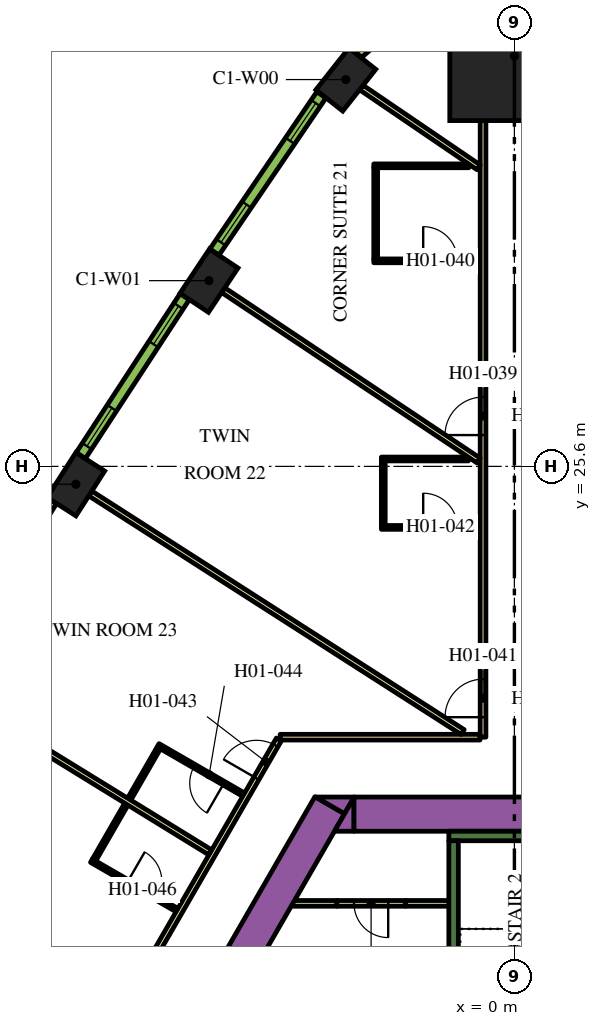
"""IFC4 building model, lengths in metres.
Left out: names, types, materials, properties, quantities, classifications, styles, units other than length and angle.
Written with IfcOpenShell. Run it as: python <this file> out.ifc"""

import sys

from ifc_helpers import new_model, si_unit, direction, frame, frame_2d, origin, origin_2d, place, context, subcontext, project, spatial, polyline, rectangle, outline, extrude, element, fill, save


model = new_model("IFC4")
c1 = context("Model", 3, precision=1e-05, world=origin(), true_north=direction((0.0, 1.0)))
c2 = subcontext(c1, "Body", "Model", "MODEL_VIEW")
j1 = project(units=[si_unit("LENGTHUNIT", "METRE"), si_unit("PLANEANGLEUNIT", "RADIAN")], contexts=[c1])
p1 = place(None, origin())
s1 = spatial("IfcSite", under=j1, at=p1, CompositionType="ELEMENT")
p2 = place(p1, origin())
s2 = spatial("IfcBuilding", under=s1, at=p2, CompositionType="ELEMENT")
p3 = place(p2, frame((0.0, 0.0, 35.4)))
s3 = spatial("IfcBuildingStorey", under=s2, at=p3, CompositionType="ELEMENT", Elevation=35.4)
p4 = place(p3, frame((0.0, 36.399, 0.0), z_axis=(0.0, 0.0, 1.0), x_axis=(0.0, 1.0, 0.0)))
e1 = element("IfcColumn", 1, at=p4, inside=s3, PredefinedType="COLUMN", context=c2, shape_type="SweptSolid", body=[
    extrude(rectangle(XDim=3.4, YDim=3.4, at=origin_2d()), origin(), (0.0, 0.0, 1.0), 3.9),
])
for number, where, z_axis, x_axis in (
    (2, (-4.436, 35.778, 0.0), (0.0, 0.0, 1.0), (-0.62, -0.784, 0.0)),
    (3, (-8.037, 30.487, 0.0), (0.0, 0.0, 1.0), (-0.555, -0.832, 0.0)),
    (4, (-11.539, 25.131, 0.0), (0.0, 0.0, 1.0), (-0.539, -0.842, 0.0)),
):
    element("IfcColumn", number, at=place(p3, frame(where, z_axis=z_axis, x_axis=x_axis)), inside=s3, PredefinedType="COLUMN", context=c2, shape_type="SweptSolid", body=[
        extrude(rectangle(XDim=1.4, YDim=0.9, at=origin_2d()), origin(), (0.0, 0.0, 1.0), 3.9),
    ])
p5 = place(p3, frame((-15.36, -1.503, 0.0), z_axis=(0.0, 0.0, 1.0), x_axis=(0.50000389221, 0.866023156604, 0.0)))
e5 = element("IfcWall", 5, at=p5, inside=s3, PredefinedType="SOLIDWALL", context=c2, shape_type="SweptSolid", body=[
    extrude(rectangle(XDim=21.0, YDim=0.9, at=frame_2d((10.5, 0.0))), origin(), (0.0, 0.0, 1.0), 3.9),
])
p6 = place(p3, origin())
e6 = element("IfcWall", 6, at=p6, inside=s3, PredefinedType="SOLIDWALL", context=c2, shape_type="SweptSolid", body=[
    extrude(outline(polyline([(-4.215, 16.9), (-4.469, 16.46), (-5.231, 16.9), (-4.215, 16.9)])), origin(), (0.0, 0.0, 1.0), 3.9),
])
p7 = place(p3, frame((-4.224, 16.45, 0.0), z_axis=(0.0, 0.0, 1.0), x_axis=(1.0, 0.0, 0.0)))
e7 = element("IfcWall", 7, at=p7, inside=s3, PredefinedType="SOLIDWALL", context=c2, shape_type="SweptSolid", body=[
    extrude(rectangle(XDim=9.488, YDim=0.9, at=frame_2d((4.744, 0.0))), origin(), (0.0, 0.0, 1.0), 3.9),
])
e8 = element("IfcWall", 8, at=p6, inside=s3, PredefinedType="SOLIDWALL", context=c2, shape_type="SweptSolid", body=[
    extrude(outline(polyline([(-4.734, 16.0), (-4.226, 16.88), (-4.226, 16.0), (-4.734, 16.0)])), origin(), (0.0, 0.0, 1.0), 3.9),
])
p8 = place(p3, frame((-1.725, 15.875, 0.0), z_axis=(0.0, 0.0, 1.0), x_axis=(1.0, 0.0, 0.0)))
e9 = element("IfcWall", 9, at=p8, inside=s3, PredefinedType="SOLIDWALL", context=c2, shape_type="SweptSolid", body=[
    extrude(rectangle(XDim=3.45, YDim=0.25, at=frame_2d((1.725, 0.0))), origin(), (0.0, 0.0, 1.0), 3.9),
])
p9 = place(p3, frame((-1.6, 8.7, 0.0), z_axis=(0.0, 0.0, 1.0), x_axis=(0.0, 1.0, 0.0)))
e10 = element("IfcWall", 10, at=p9, inside=s3, PredefinedType="SOLIDWALL", context=c2, shape_type="SweptSolid", body=[
    extrude(rectangle(XDim=7.05, YDim=0.25, at=frame_2d((3.525, 0.0))), origin(), (0.0, 0.0, 1.0), 3.9),
])
p10 = place(p3, frame((-5.851, 14.102, 0.0), z_axis=(0.0, 0.0, 1.0), x_axis=(1.0, 0.0, 0.0)))
e11 = element("IfcWall", 11, at=p10, inside=s3, PredefinedType="PARTITIONING", context=c2, shape_type="SweptSolid", body=[
    extrude(rectangle(XDim=1.18, YDim=0.15, at=frame_2d((0.59, 0.0))), origin(), (0.0, 0.0, 1.0), 2.75),
])
p11 = place(p3, frame((-2.871, 14.102, 0.0), z_axis=(0.0, 0.0, 1.0), x_axis=(1.0, 0.0, 0.0)))
e12 = element("IfcWall", 12, at=p11, inside=s3, PredefinedType="PARTITIONING", context=c2, shape_type="SweptSolid", body=[
    extrude(rectangle(XDim=1.196, YDim=0.15, at=frame_2d((0.598, 0.0))), origin(), (0.0, 0.0, 1.0), 2.75),
])
p12 = place(p3, frame((-2.871, 14.102, 0.0), z_axis=(0.0, 0.0, 1.0), x_axis=(-1.0, 0.0, 0.0)))
e13 = element("IfcWall", 13, at=p12, inside=s3, PredefinedType="PARTITIONING", context=c2, shape_type="SweptSolid", body=[
    extrude(rectangle(XDim=1.8, YDim=0.15, at=frame_2d((0.9, 0.0))), origin(), (0.0, 0.0, 1.0), 2.75),
])
p13 = place(p12, frame((0.45, 0.0, 0.0)))
e14 = element("IfcOpeningElement", 14, at=p13, cuts=e13, PredefinedType="OPENING", context=c2, shape_type="SweptSolid", body=[
    extrude(rectangle(XDim=0.9, YDim=2.1, at=frame_2d((0.45, 1.05))), frame((0.0, 0.085, 0.0), z_axis=(0.0, -1.0, 0.0), x_axis=(1.0, 0.0, 0.0)), (0.0, 0.0, 1.0), 0.17),
])
p14 = place(p3, frame((-0.825, 18.475, 0.0), z_axis=(0.0, 0.0, 1.0), x_axis=(0.0, 1.0, 0.0)))
e15 = element("IfcWall", 15, at=p14, inside=s3, PredefinedType="PARTITIONING", context=c2, shape_type="SweptSolid", body=[
    extrude(rectangle(XDim=16.224, YDim=0.15, at=frame_2d((8.112, 0.0))), origin(), (0.0, 0.0, 1.0), 2.75),
])
p15 = place(p14, frame((7.949, 0.0, 0.0)))
e16 = element("IfcOpeningElement", 16, at=p15, cuts=e15, PredefinedType="OPENING", context=c2, shape_type="SweptSolid", body=[
    extrude(rectangle(XDim=1.0, YDim=2.1, at=frame_2d((0.5, 1.05))), frame((0.0, 0.085, 0.0), z_axis=(0.0, -1.0, 0.0), x_axis=(1.0, 0.0, 0.0)), (0.0, 0.0, 1.0), 0.17),
])
p16 = place(p14, frame((0.526, 0.0, 0.0)))
e17 = element("IfcOpeningElement", 17, at=p16, cuts=e15, PredefinedType="OPENING", context=c2, shape_type="SweptSolid", body=[
    extrude(rectangle(XDim=1.0, YDim=2.1, at=frame_2d((0.5, 1.05))), frame((0.0, 0.085, 0.0), z_axis=(0.0, -1.0, 0.0), x_axis=(1.0, 0.0, 0.0)), (0.0, 0.0, 1.0), 0.17),
])
p17 = place(p3, frame((-6.163, 18.475, 0.0), z_axis=(0.0, 0.0, 1.0), x_axis=(1.0, 0.0, 0.0)))
e18 = element("IfcWall", 18, at=p17, inside=s3, PredefinedType="PARTITIONING", context=c2, shape_type="SweptSolid", body=[
    extrude(rectangle(XDim=5.258, YDim=0.15, at=frame_2d((2.629, 0.0))), origin(), (0.0, 0.0, 1.0), 2.75),
])
p18 = place(p3, frame((-19.081, -3.9, 0.0), z_axis=(0.0, 0.0, 1.0), x_axis=(0.499998313975, 0.866026377209, 0.0)))
e19 = element("IfcWall", 19, at=p18, inside=s3, PredefinedType="PARTITIONING", context=c2, shape_type="SweptSolid", body=[
    extrude(rectangle(XDim=25.766, YDim=0.15, at=frame_2d((12.883, 0.0))), origin(), (0.0, 0.0, 1.0), 2.75),
])
p19 = place(p18, frame((24.586, 0.0, 0.0)))
e20 = element("IfcOpeningElement", 20, at=p19, cuts=e19, PredefinedType="OPENING", context=c2, shape_type="SweptSolid", body=[
    extrude(rectangle(XDim=1.0, YDim=2.1, at=frame_2d((0.5, 1.05))), frame((0.0, 0.085, 0.0), z_axis=(0.0, -1.0, 0.0), x_axis=(1.0, 0.0, 0.0)), (0.0, 0.0, 1.0), 0.17),
])
p20 = place(p18, frame((16.196, 0.0, 0.0)))
e21 = element("IfcOpeningElement", 21, at=p20, cuts=e19, PredefinedType="OPENING", context=c2, shape_type="SweptSolid", body=[
    extrude(rectangle(XDim=1.0, YDim=2.1, at=frame_2d((0.5, 1.05))), frame((0.0, 0.085, 0.0), z_axis=(0.0, -1.0, 0.0), x_axis=(1.0, 0.0, 0.0)), (0.0, 0.0, 1.0), 0.17),
])
p21 = place(p18, frame((14.789, 0.0, 0.0)))
e22 = element("IfcOpeningElement", 22, at=p21, cuts=e19, PredefinedType="OPENING", context=c2, shape_type="SweptSolid", body=[
    extrude(rectangle(XDim=1.1, YDim=2.1, at=frame_2d((0.55, 1.05))), frame((0.0, 0.085, 0.0), z_axis=(0.0, -1.0, 0.0), x_axis=(1.0, 0.0, 0.0)), (0.0, 0.0, 1.0), 0.17),
])
p22 = place(p18, frame((3.698, 0.0, 0.0)))
e23 = element("IfcOpeningElement", 23, at=p22, cuts=e19, PredefinedType="OPENING", context=c2, shape_type="SweptSolid", body=[
    extrude(rectangle(XDim=1.0, YDim=2.1, at=frame_2d((0.5, 1.05))), frame((0.0, 0.085, 0.0), z_axis=(0.0, -1.0, 0.0), x_axis=(1.0, 0.0, 0.0)), (0.0, 0.0, 1.0), 0.17),
])
p23 = place(p18, frame((1.531, 0.0, 0.0)))
e24 = element("IfcOpeningElement", 24, at=p23, cuts=e19, PredefinedType="OPENING", context=c2, shape_type="SweptSolid", body=[
    extrude(rectangle(XDim=0.9, YDim=2.1, at=frame_2d((0.45, 1.05))), frame((0.0, 0.085, 0.0), z_axis=(0.0, -1.0, 0.0), x_axis=(1.0, 0.0, 0.0)), (0.0, 0.0, 1.0), 0.17),
])
p24 = place(p3, frame((-17.856, 13.999, 0.0), z_axis=(0.0, 0.0, 1.0), x_axis=(0.861371519381, -0.507975497047, 0.0)))
e25 = element("IfcWall", 25, at=p24, inside=s3, PredefinedType="PARTITIONING", context=c2, shape_type="SweptSolid", body=[
    extrude(rectangle(XDim=7.804, YDim=0.15, at=frame_2d((3.902, 0.0))), origin(), (0.0, 0.0, 1.0), 2.75),
])
p25 = place(p3, frame((-14.558, 19.475, 0.0), z_axis=(0.0, 0.0, 1.0), x_axis=(0.851829455142, -0.523819223925, 0.0)))
e26 = element("IfcWall", 26, at=p25, inside=s3, PredefinedType="PARTITIONING", context=c2, shape_type="SweptSolid", body=[
    extrude(rectangle(XDim=7.688, YDim=0.15, at=frame_2d((3.844, 0.0))), origin(), (0.0, 0.0, 1.0), 2.75),
])
p26 = place(p3, frame((-11.16, 24.888, 0.0), z_axis=(0.0, 0.0, 1.0), x_axis=(0.84199813156, -0.539480441211, 0.0)))
e27 = element("IfcWall", 27, at=p26, inside=s3, PredefinedType="PARTITIONING", context=c2, shape_type="SweptSolid", body=[
    extrude(rectangle(XDim=11.638, YDim=0.15, at=frame_2d((5.819, 0.0))), origin(), (0.0, 0.0, 1.0), 2.75),
])
p27 = place(p3, frame((-7.662, 30.238, 0.0), z_axis=(0.0, 0.0, 1.0), x_axis=(0.831882886825, -0.554951225431, 0.0)))
e28 = element("IfcWall", 28, at=p27, inside=s3, PredefinedType="PARTITIONING", context=c2, shape_type="SweptSolid", body=[
    extrude(rectangle(XDim=8.079, YDim=0.15, at=frame_2d((4.04, 0.0))), origin(), (0.0, 0.0, 1.0), 2.75),
])
p28 = place(p3, frame((-4.028, 35.569, 0.0), z_axis=(0.0, 0.0, 1.0), x_axis=(0.826730622998, -0.562597971021, 0.0)))
e29 = element("IfcWall", 29, at=p28, inside=s3, PredefinedType="PARTITIONING", context=c2, shape_type="SweptSolid", body=[
    extrude(rectangle(XDim=3.733, YDim=0.15, at=frame_2d((1.867, 0.0))), origin(), (0.0, 0.0, 1.0), 2.75),
])
p29 = place(p3, frame((-3.7, 31.009, 0.0), z_axis=(0.0, 0.0, 1.0), x_axis=(1.0, 0.0, 0.0)))
e30 = element("IfcWall", 30, at=p29, inside=s3, PredefinedType="PARTITIONING", context=c2, shape_type="SweptSolid", body=[
    extrude(rectangle(XDim=2.8, YDim=0.1, at=frame_2d((1.4, 0.0))), origin(), (0.0, 0.0, 1.0), 2.75),
])
p30 = place(p29, frame((1.3, 0.0, 0.0)))
e31 = element("IfcOpeningElement", 31, at=p30, cuts=e30, PredefinedType="OPENING", context=c2, shape_type="SweptSolid", body=[
    extrude(rectangle(XDim=0.9, YDim=2.1, at=frame_2d((0.45, 1.05))), frame((0.0, 0.06, 0.0), z_axis=(0.0, -1.0, 0.0), x_axis=(1.0, 0.0, 0.0)), (0.0, 0.0, 1.0), 0.12),
])
p31 = place(p3, frame((-3.65, 31.059, 0.0), z_axis=(0.0, 0.0, 1.0), x_axis=(0.0, 1.0, 0.0)))
e32 = element("IfcWall", 32, at=p31, inside=s3, PredefinedType="PARTITIONING", context=c2, shape_type="SweptSolid", body=[
    extrude(rectangle(XDim=2.4, YDim=0.1, at=frame_2d((1.2, 0.0))), origin(), (0.0, 0.0, 1.0), 2.75),
])
p32 = place(p3, frame((-1.2, 33.509, 0.0), z_axis=(0.0, 0.0, 1.0), x_axis=(-1.0, 0.0, 0.0)))
e33 = element("IfcWall", 33, at=p32, inside=s3, PredefinedType="PARTITIONING", context=c2, shape_type="SweptSolid", body=[
    extrude(rectangle(XDim=2.5, YDim=0.1, at=frame_2d((1.25, 0.0))), origin(), (0.0, 0.0, 1.0), 2.75),
])
p33 = place(p3, frame((-3.5, 23.995, 0.0), z_axis=(0.0, 0.0, 1.0), x_axis=(1.0, 0.0, 0.0)))
e34 = element("IfcWall", 34, at=p33, inside=s3, PredefinedType="PARTITIONING", context=c2, shape_type="SweptSolid", body=[
    extrude(rectangle(XDim=2.6, YDim=0.1, at=frame_2d((1.3, 0.0))), origin(), (0.0, 0.0, 1.0), 2.75),
])
p34 = place(p33, frame((1.1, 0.0, 0.0)))
e35 = element("IfcOpeningElement", 35, at=p34, cuts=e34, PredefinedType="OPENING", context=c2, shape_type="SweptSolid", body=[
    extrude(rectangle(XDim=0.9, YDim=2.1, at=frame_2d((0.45, 1.05))), frame((0.0, 0.06, 0.0), z_axis=(0.0, -1.0, 0.0), x_axis=(1.0, 0.0, 0.0)), (0.0, 0.0, 1.0), 0.12),
])
p35 = place(p3, frame((-3.45, 24.045, 0.0), z_axis=(0.0, 0.0, 1.0), x_axis=(0.0, 1.0, 0.0)))
e36 = element("IfcWall", 36, at=p35, inside=s3, PredefinedType="PARTITIONING", context=c2, shape_type="SweptSolid", body=[
    extrude(rectangle(XDim=1.7, YDim=0.1, at=frame_2d((0.85, 0.0))), origin(), (0.0, 0.0, 1.0), 2.75),
])
p36 = place(p3, frame((-1.21, 25.795, 0.0), z_axis=(0.0, 0.0, 1.0), x_axis=(-1.0, 0.0, 0.0)))
e37 = element("IfcWall", 37, at=p36, inside=s3, PredefinedType="PARTITIONING", context=c2, shape_type="SweptSolid", body=[
    extrude(rectangle(XDim=2.29, YDim=0.1, at=frame_2d((1.145, 0.0))), origin(), (0.0, 0.0, 1.0), 2.75),
])
p37 = place(p3, frame((-7.124, 16.961, 0.0), z_axis=(0.0, 0.0, 1.0), x_axis=(-0.866021400173, 0.500006934395, 0.0)))
e38 = element("IfcWall", 38, at=p37, inside=s3, PredefinedType="PARTITIONING", context=c2, shape_type="SweptSolid", body=[
    extrude(rectangle(XDim=2.6, YDim=0.1, at=frame_2d((1.3, 0.0))), origin(), (0.0, 0.0, 1.0), 2.75),
])
p38 = place(p37, frame((0.6, 0.0, 0.0)))
e39 = element("IfcOpeningElement", 39, at=p38, cuts=e38, PredefinedType="OPENING", context=c2, shape_type="SweptSolid", body=[
    extrude(rectangle(XDim=0.9, YDim=2.1, at=frame_2d((0.45, 1.05))), frame((0.0, 0.06, 0.0), z_axis=(0.0, -1.0, 0.0), x_axis=(1.0, 0.0, 0.0)), (0.0, 0.0, 1.0), 0.12),
])
p39 = place(p3, frame((-9.362, 18.184, 0.0), z_axis=(0.0, 0.0, 1.0), x_axis=(-0.499992328818, -0.866029832698, 0.0)))
e40 = element("IfcWall", 40, at=p39, inside=s3, PredefinedType="PARTITIONING", context=c2, shape_type="SweptSolid", body=[
    extrude(rectangle(XDim=1.54, YDim=0.1, at=frame_2d((0.77, 0.0))), origin(), (0.0, 0.0, 1.0), 2.75),
])
p40 = place(p3, frame((-11.129, 15.224, 0.0), z_axis=(0.0, 0.0, 1.0), x_axis=(0.866021400173, -0.500006934395, 0.0)))
e41 = element("IfcWall", 41, at=p40, inside=s3, PredefinedType="PARTITIONING", context=c2, shape_type="SweptSolid", body=[
    extrude(rectangle(XDim=2.6, YDim=0.1, at=frame_2d((1.3, 0.0))), origin(), (0.0, 0.0, 1.0), 2.75),
])
p41 = place(p40, frame((1.1, 0.0, 0.0)))
e42 = element("IfcOpeningElement", 42, at=p41, cuts=e41, PredefinedType="OPENING", context=c2, shape_type="SweptSolid", body=[
    extrude(rectangle(XDim=0.9, YDim=2.1, at=frame_2d((0.45, 1.05))), frame((0.0, 0.06, 0.0), z_axis=(0.0, -1.0, 0.0), x_axis=(1.0, 0.0, 0.0)), (0.0, 0.0, 1.0), 0.12),
])
p42 = place(p3, frame((-11.061, 15.242, 0.0), z_axis=(0.0, 0.0, 1.0), x_axis=(0.499976720371, 0.866038843867, 0.0)))
e43 = element("IfcWall", 43, at=p42, inside=s3, PredefinedType="PARTITIONING", context=c2, shape_type="SweptSolid", body=[
    extrude(rectangle(XDim=1.69, YDim=0.1, at=frame_2d((0.845, 0.0))), origin(), (0.0, 0.0, 1.0), 2.75),
])
p43 = place(p3, frame((-3.064, 37.395, 0.0), z_axis=(0.0, 0.0, 1.0), x_axis=(-0.749812680302, -0.661650167731, 0.0)))
e44 = element("IfcWall", 44, at=p43, inside=s3, PredefinedType="SOLIDWALL", context=c2, shape_type="SweptSolid", body=[
    extrude(rectangle(XDim=1.415, YDim=0.29, at=frame_2d((0.708, 0.0))), origin(), (0.0, 0.0, 1.0), 3.65),
])
p44 = place(p43, frame((0.258, 0.0, 0.9)))
e45 = element("IfcOpeningElement", 45, at=p44, cuts=e44, PredefinedType="OPENING", context=c2, shape_type="SweptSolid", body=[
    extrude(rectangle(XDim=0.9, YDim=2.15, at=frame_2d((0.45, 1.075))), frame((0.0, 0.155, 0.0), z_axis=(0.0, -1.0, 0.0), x_axis=(1.0, 0.0, 0.0)), (0.0, 0.0, 1.0), 0.31),
])
p45 = place(p3, frame((-5.078, 35.376, 0.0), z_axis=(0.0, 0.0, 1.0), x_axis=(-0.562610153679, -0.826722332454, 0.0)))
e46 = element("IfcWall", 46, at=p45, inside=s3, PredefinedType="SOLIDWALL", context=c2, shape_type="SweptSolid", body=[
    extrude(rectangle(XDim=5.006, YDim=0.29, at=frame_2d((2.503, 0.0))), origin(), (0.0, 0.0, 1.0), 3.65),
])
p46 = place(p45, frame((0.265, 0.0, 0.9)))
e47 = element("IfcOpeningElement", 47, at=p46, cuts=e46, PredefinedType="OPENING", context=c2, shape_type="SweptSolid", body=[
    extrude(rectangle(XDim=1.2, YDim=2.15, at=frame_2d((0.6, 1.075))), frame((0.0, 0.155, 0.0), z_axis=(0.0, -1.0, 0.0), x_axis=(1.0, 0.0, 0.0)), (0.0, 0.0, 1.0), 0.31),
])
p47 = place(p45, frame((3.495, 0.0, 0.9)))
e48 = element("IfcOpeningElement", 48, at=p47, cuts=e46, PredefinedType="OPENING", context=c2, shape_type="SweptSolid", body=[
    extrude(rectangle(XDim=1.2, YDim=2.15, at=frame_2d((0.6, 1.075))), frame((0.0, 0.155, 0.0), z_axis=(0.0, -1.0, 0.0), x_axis=(1.0, 0.0, 0.0)), (0.0, 0.0, 1.0), 0.31),
])
p48 = place(p3, frame((-8.676, 30.068, 0.0), z_axis=(0.0, 0.0, 1.0), x_axis=(-0.547204617628, -0.836998868845, 0.0)))
e49 = element("IfcWall", 49, at=p48, inside=s3, PredefinedType="SOLIDWALL", context=c2, shape_type="SweptSolid", body=[
    extrude(rectangle(XDim=4.998, YDim=0.29, at=frame_2d((2.499, 0.0))), origin(), (0.0, 0.0, 1.0), 3.65),
])
p49 = place(p48, frame((0.297, 0.0, 0.9)))
e50 = element("IfcOpeningElement", 50, at=p49, cuts=e49, PredefinedType="OPENING", context=c2, shape_type="SweptSolid", body=[
    extrude(rectangle(XDim=1.2, YDim=2.15, at=frame_2d((0.6, 1.075))), frame((0.0, 0.155, 0.0), z_axis=(0.0, -1.0, 0.0), x_axis=(1.0, 0.0, 0.0)), (0.0, 0.0, 1.0), 0.31),
])
p50 = place(p48, frame((3.501, 0.0, 0.9)))
e51 = element("IfcOpeningElement", 51, at=p50, cuts=e49, PredefinedType="OPENING", context=c2, shape_type="SweptSolid", body=[
    extrude(rectangle(XDim=1.2, YDim=2.15, at=frame_2d((0.6, 1.075))), frame((0.0, 0.155, 0.0), z_axis=(0.0, -1.0, 0.0), x_axis=(1.0, 0.0, 0.0)), (0.0, 0.0, 1.0), 0.31),
])
p51 = place(p3, frame((-12.17, 24.699, 0.0), z_axis=(0.0, 0.0, 1.0), x_axis=(-0.531688286542, -0.846940119462, 0.0)))
e52 = element("IfcWall", 52, at=p51, inside=s3, PredefinedType="SOLIDWALL", context=c2, shape_type="SweptSolid", body=[
    extrude(rectangle(XDim=4.998, YDim=0.29, at=frame_2d((2.499, 0.0))), origin(), (0.0, 0.0, 1.0), 3.65),
])
p52 = place(p51, frame((0.297, 0.0, 0.9)))
e53 = element("IfcOpeningElement", 53, at=p52, cuts=e52, PredefinedType="OPENING", context=c2, shape_type="SweptSolid", body=[
    extrude(rectangle(XDim=1.2, YDim=2.15, at=frame_2d((0.6, 1.075))), frame((0.0, 0.155, 0.0), z_axis=(0.0, -1.0, 0.0), x_axis=(1.0, 0.0, 0.0)), (0.0, 0.0, 1.0), 0.31),
])
p53 = place(p51, frame((3.501, 0.0, 0.9)))
e54 = element("IfcOpeningElement", 54, at=p53, cuts=e52, PredefinedType="OPENING", context=c2, shape_type="SweptSolid", body=[
    extrude(rectangle(XDim=1.2, YDim=2.15, at=frame_2d((0.6, 1.075))), frame((0.0, 0.155, 0.0), z_axis=(0.0, -1.0, 0.0), x_axis=(1.0, 0.0, 0.0)), (0.0, 0.0, 1.0), 0.31),
])
p54 = place(p13, origin())
e55 = element("IfcDoor", 55, at=p54, inside=s3, OperationType="SINGLE_SWING_LEFT", PredefinedType="DOOR", context=c2, shape_type="SweptSolid", body=[
    extrude(rectangle(XDim=0.9, YDim=2.1, at=frame_2d((0.45, 1.05))), frame((0.0, 0.025, 0.0), z_axis=(0.0, -1.0, 0.0), x_axis=(1.0, 0.0, 0.0)), (0.0, 0.0, 1.0), 0.05),
])
fill(e14, e55)
p55 = place(p15, origin())
e56 = element("IfcDoor", 56, at=p55, inside=s3, OperationType="SINGLE_SWING_LEFT", PredefinedType="DOOR", context=c2, shape_type="SweptSolid", body=[
    extrude(rectangle(XDim=1.0, YDim=2.1, at=frame_2d((0.5, 1.05))), frame((0.0, 0.025, 0.0), z_axis=(0.0, -1.0, 0.0), x_axis=(1.0, 0.0, 0.0)), (0.0, 0.0, 1.0), 0.05),
])
fill(e16, e56)
p56 = place(p30, origin())
e57 = element("IfcDoor", 57, at=p56, inside=s3, OperationType="SINGLE_SWING_RIGHT", PredefinedType="DOOR", context=c2, shape_type="SweptSolid", body=[
    extrude(rectangle(XDim=0.9, YDim=2.1, at=frame_2d((0.45, 1.05))), frame((0.0, 0.025, 0.0), z_axis=(0.0, -1.0, 0.0), x_axis=(1.0, 0.0, 0.0)), (0.0, 0.0, 1.0), 0.05),
])
fill(e31, e57)
p57 = place(p16, origin())
e58 = element("IfcDoor", 58, at=p57, inside=s3, OperationType="SINGLE_SWING_LEFT", PredefinedType="DOOR", context=c2, shape_type="SweptSolid", body=[
    extrude(rectangle(XDim=1.0, YDim=2.1, at=frame_2d((0.5, 1.05))), frame((0.0, 0.025, 0.0), z_axis=(0.0, -1.0, 0.0), x_axis=(1.0, 0.0, 0.0)), (0.0, 0.0, 1.0), 0.05),
])
fill(e17, e58)
p58 = place(p34, origin())
e59 = element("IfcDoor", 59, at=p58, inside=s3, OperationType="SINGLE_SWING_LEFT", PredefinedType="DOOR", context=c2, shape_type="SweptSolid", body=[
    extrude(rectangle(XDim=0.9, YDim=2.1, at=frame_2d((0.45, 1.05))), frame((0.0, 0.025, 0.0), z_axis=(0.0, -1.0, 0.0), x_axis=(1.0, 0.0, 0.0)), (0.0, 0.0, 1.0), 0.05),
])
fill(e35, e59)
p59 = place(p19, origin())
e60 = element("IfcDoor", 60, at=p59, inside=s3, OperationType="SINGLE_SWING_RIGHT", PredefinedType="DOOR", context=c2, shape_type="SweptSolid", body=[
    extrude(rectangle(XDim=1.0, YDim=2.1, at=frame_2d((0.5, 1.05))), frame((0.0, 0.025, 0.0), z_axis=(0.0, -1.0, 0.0), x_axis=(1.0, 0.0, 0.0)), (0.0, 0.0, 1.0), 0.05),
])
fill(e20, e60)
p60 = place(p38, origin())
e61 = element("IfcDoor", 61, at=p60, inside=s3, OperationType="SINGLE_SWING_LEFT", PredefinedType="DOOR", context=c2, shape_type="SweptSolid", body=[
    extrude(rectangle(XDim=0.9, YDim=2.1, at=frame_2d((0.45, 1.05))), frame((0.0, 0.025, 0.0), z_axis=(0.0, -1.0, 0.0), x_axis=(1.0, 0.0, 0.0)), (0.0, 0.0, 1.0), 0.05),
])
fill(e39, e61)
p61 = place(p41, origin())
e62 = element("IfcDoor", 62, at=p61, inside=s3, OperationType="SINGLE_SWING_RIGHT", PredefinedType="DOOR", context=c2, shape_type="SweptSolid", body=[
    extrude(rectangle(XDim=0.9, YDim=2.1, at=frame_2d((0.45, 1.05))), frame((0.0, 0.025, 0.0), z_axis=(0.0, -1.0, 0.0), x_axis=(1.0, 0.0, 0.0)), (0.0, 0.0, 1.0), 0.05),
])
fill(e42, e62)
p62 = place(p46, origin())
e63 = element("IfcWindow", 63, at=p62, inside=s3, PartitioningType="DOUBLE_PANEL_VERTICAL", PredefinedType="WINDOW", context=c2, shape_type="SweptSolid", body=[
    extrude(rectangle(XDim=1.2, YDim=2.15, at=frame_2d((0.6, 1.075))), frame((0.0, 0.015, 0.0), z_axis=(0.0, -1.0, 0.0), x_axis=(1.0, 0.0, 0.0)), (0.0, 0.0, 1.0), 0.06),
])
fill(e47, e63)
p63 = place(p47, origin())
e64 = element("IfcWindow", 64, at=p63, inside=s3, PartitioningType="DOUBLE_PANEL_VERTICAL", PredefinedType="WINDOW", context=c2, shape_type="SweptSolid", body=[
    extrude(rectangle(XDim=1.2, YDim=2.15, at=frame_2d((0.6, 1.075))), frame((0.0, 0.015, 0.0), z_axis=(0.0, -1.0, 0.0), x_axis=(1.0, 0.0, 0.0)), (0.0, 0.0, 1.0), 0.06),
])
fill(e48, e64)
p64 = place(p49, origin())
e65 = element("IfcWindow", 65, at=p64, inside=s3, PartitioningType="DOUBLE_PANEL_VERTICAL", PredefinedType="WINDOW", context=c2, shape_type="SweptSolid", body=[
    extrude(rectangle(XDim=1.2, YDim=2.15, at=frame_2d((0.6, 1.075))), frame((0.0, 0.015, 0.0), z_axis=(0.0, -1.0, 0.0), x_axis=(1.0, 0.0, 0.0)), (0.0, 0.0, 1.0), 0.06),
])
fill(e50, e65)
p65 = place(p50, origin())
e66 = element("IfcWindow", 66, at=p65, inside=s3, PartitioningType="DOUBLE_PANEL_VERTICAL", PredefinedType="WINDOW", context=c2, shape_type="SweptSolid", body=[
    extrude(rectangle(XDim=1.2, YDim=2.15, at=frame_2d((0.6, 1.075))), frame((0.0, 0.015, 0.0), z_axis=(0.0, -1.0, 0.0), x_axis=(1.0, 0.0, 0.0)), (0.0, 0.0, 1.0), 0.06),
])
fill(e51, e66)
save(model, sys.argv[1])
